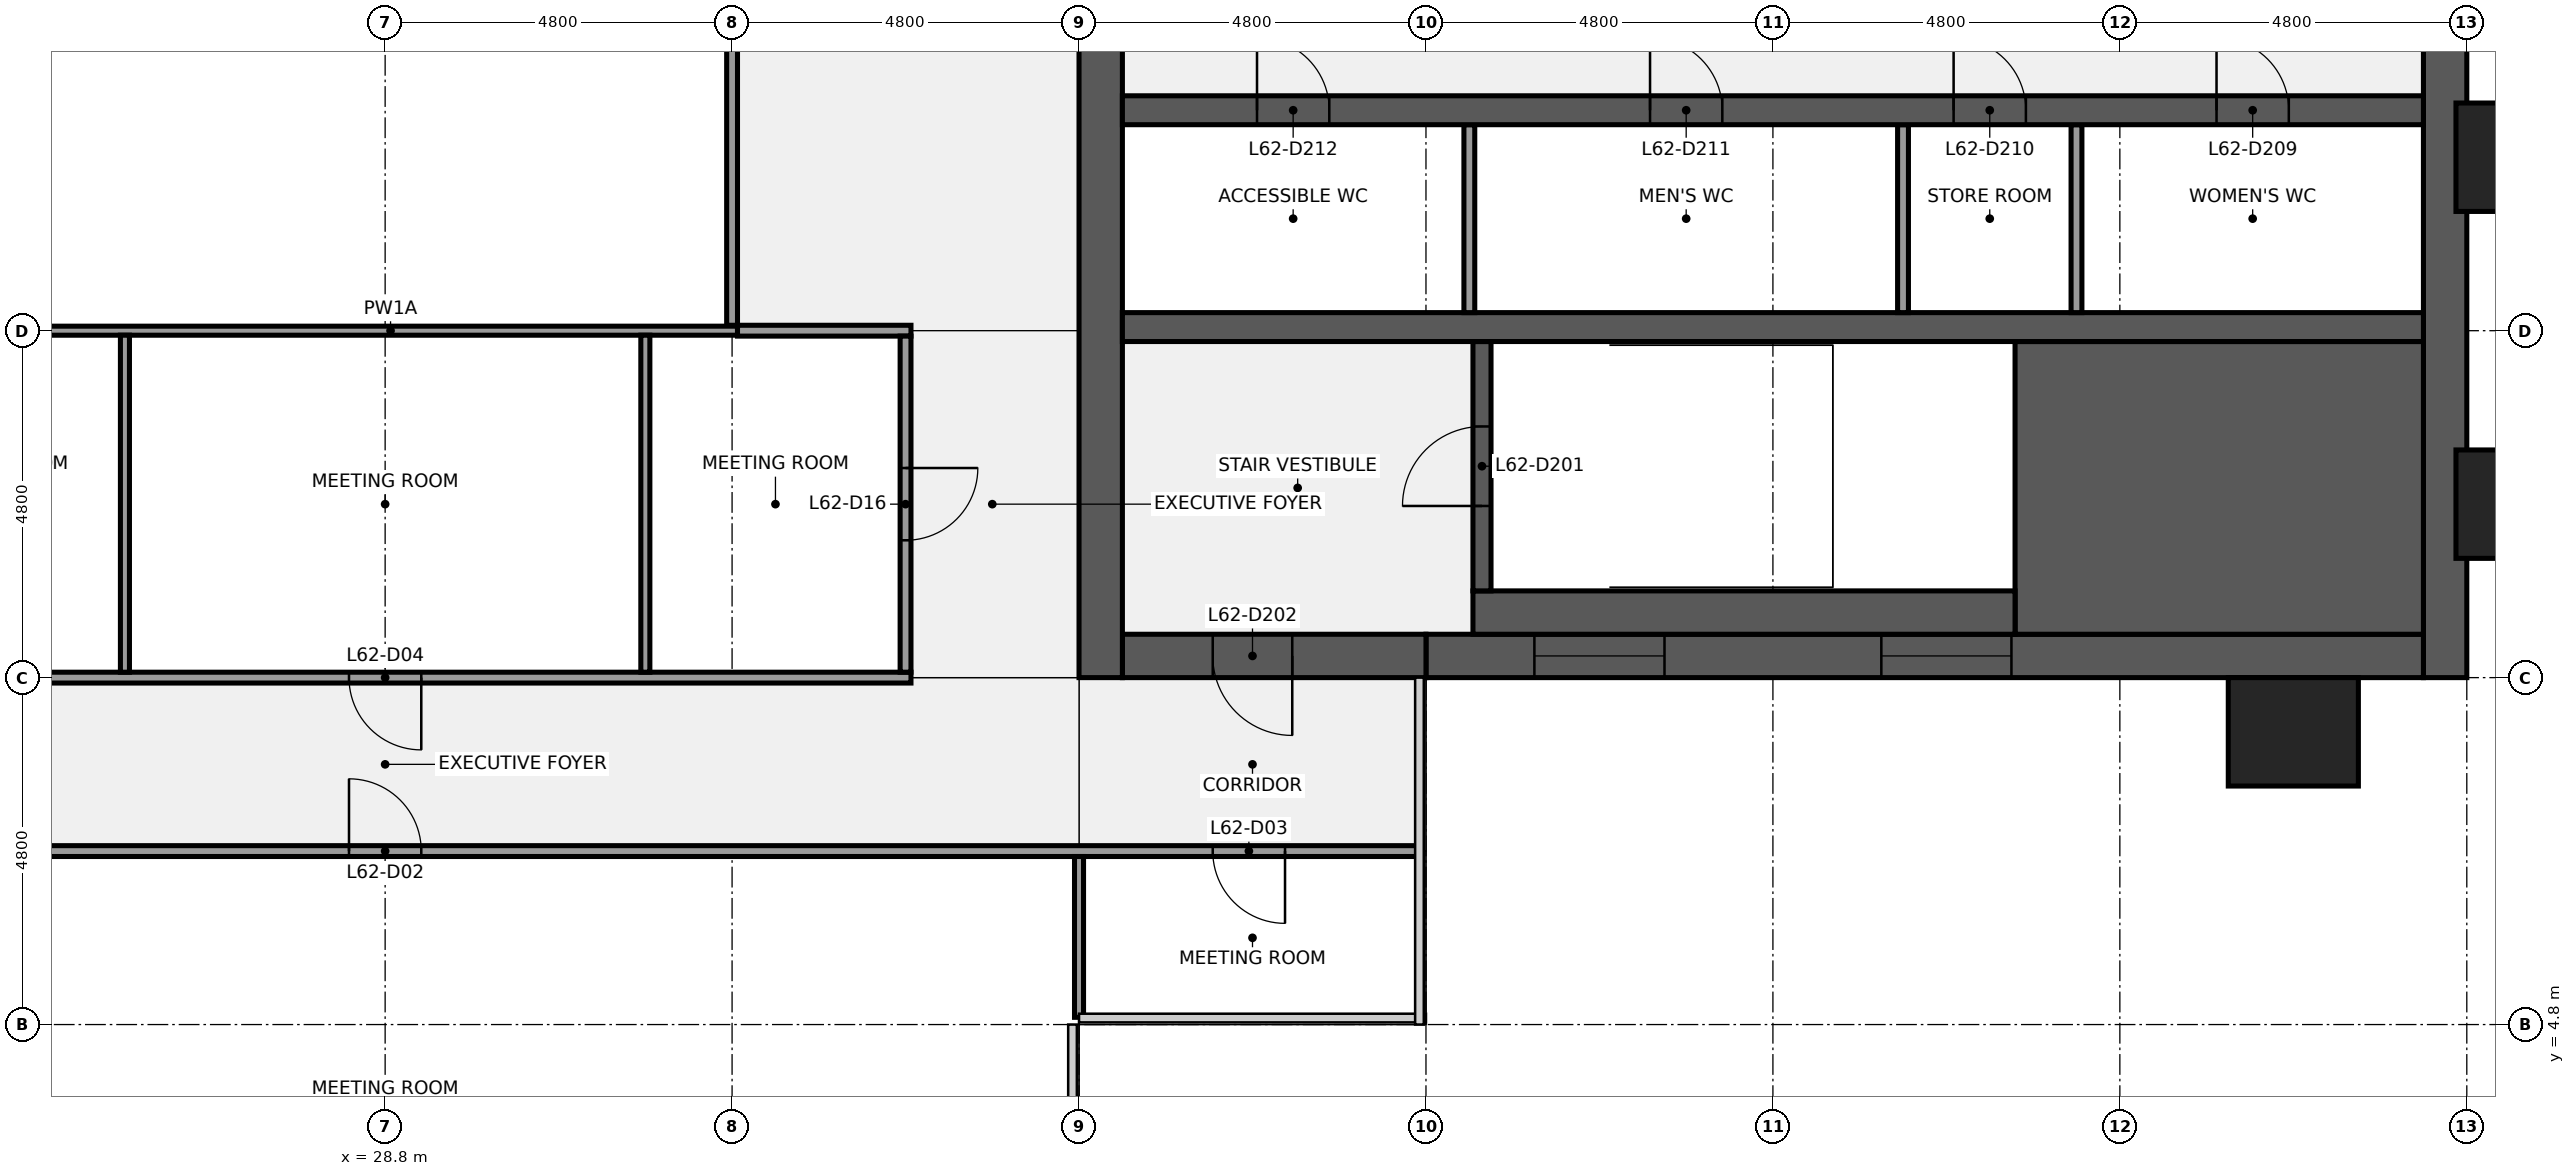
"""IFC4 building model, lengths in metres.
Left out: names, types, materials, properties, quantities, classifications, styles, units other than length and angle.
Written with IfcOpenShell. Run it as: python <this file> out.ifc"""

import sys

from ifc_helpers import new_model, si_unit, direction, frame, frame_2d, origin, origin_2d, place, context, subcontext, project, spatial, rectangle, extrude, element, fill, save


model = new_model("IFC4")
c1 = context("Model", 3, precision=1e-05, world=origin(), true_north=direction((0.0, 1.0)))
c2 = subcontext(c1, "Body", "Model", "MODEL_VIEW")
j1 = project(units=[si_unit("LENGTHUNIT", "METRE"), si_unit("PLANEANGLEUNIT", "RADIAN")], contexts=[c1])
p1 = place(None, origin())
s1 = spatial("IfcSite", under=j1, at=p1, CompositionType="ELEMENT")
p2 = place(p1, origin())
s2 = spatial("IfcBuilding", under=s1, at=p2, CompositionType="ELEMENT")
p3 = place(p2, frame((0.0, 0.0, 286.3)))
s3 = spatial("IfcBuildingStorey", under=s2, at=p3, CompositionType="ELEMENT", Elevation=286.3)
p4 = place(p3, frame((57.3, 38.4, 0.0), z_axis=(0.0, 0.0, 1.0), x_axis=(0.0, -1.0, 0.0)))
e1 = element("IfcWall", 1, at=p4, inside=s3, PredefinedType="SHEAR", context=c2, shape_type="SweptSolid", body=[
    extrude(rectangle(XDim=28.8, YDim=0.6, at=frame_2d((14.4, 0.0))), origin(), (0.0, 0.0, 1.0), 3.84),
])
p5 = place(p4, frame((18.45, 0.0, 0.9)))
e2 = element("IfcOpeningElement", 2, at=p5, cuts=e1, PredefinedType="OPENING", context=c2, shape_type="SweptSolid", body=[
    extrude(rectangle(XDim=1.5, YDim=1.5, at=frame_2d((0.75, 0.75))), frame((0.0, 0.31, 0.0), z_axis=(0.0, -1.0, 0.0), x_axis=(1.0, 0.0, 0.0)), (0.0, 0.0, 1.0), 0.62),
])
p6 = place(p4, frame((8.85, 0.0, 0.9)))
e3 = element("IfcOpeningElement", 3, at=p6, cuts=e1, PredefinedType="OPENING", context=c2, shape_type="SweptSolid", body=[
    extrude(rectangle(XDim=1.5, YDim=1.5, at=frame_2d((0.75, 0.75))), frame((0.0, 0.31, 0.0), z_axis=(0.0, -1.0, 0.0), x_axis=(1.0, 0.0, 0.0)), (0.0, 0.0, 1.0), 0.62),
])
p7 = place(p3, frame((57.0, 9.9, 0.0), z_axis=(0.0, 0.0, 1.0), x_axis=(-1.0, 0.0, 0.0)))
e4 = element("IfcWall", 4, at=p7, inside=s3, PredefinedType="SHEAR", context=c2, shape_type="SweptSolid", body=[
    extrude(rectangle(XDim=13.8, YDim=0.6, at=frame_2d((6.9, 0.0))), origin(), (0.0, 0.0, 1.0), 3.84),
])
p8 = place(p7, frame((5.7, 0.0, 0.9)))
e5 = element("IfcOpeningElement", 5, at=p8, cuts=e4, PredefinedType="OPENING", context=c2, shape_type="SweptSolid", body=[
    extrude(rectangle(XDim=1.8, YDim=1.5, at=frame_2d((0.9, 0.75))), frame((0.0, 0.31, 0.0), z_axis=(0.0, -1.0, 0.0), x_axis=(1.0, 0.0, 0.0)), (0.0, 0.0, 1.0), 0.62),
])
p9 = place(p7, frame((10.5, 0.0, 0.9)))
e6 = element("IfcOpeningElement", 6, at=p9, cuts=e4, PredefinedType="OPENING", context=c2, shape_type="SweptSolid", body=[
    extrude(rectangle(XDim=1.8, YDim=1.5, at=frame_2d((0.9, 0.75))), frame((0.0, 0.31, 0.0), z_axis=(0.0, -1.0, 0.0), x_axis=(1.0, 0.0, 0.0)), (0.0, 0.0, 1.0), 0.62),
])
p10 = place(p3, frame((43.2, 9.9, 0.0), z_axis=(0.0, 0.0, 1.0), x_axis=(-1.0, 0.0, 0.0)))
e7 = element("IfcWall", 7, at=p10, inside=s3, PredefinedType="SHEAR", context=c2, shape_type="SweptSolid", body=[
    extrude(rectangle(XDim=4.2, YDim=0.6, at=frame_2d((2.1, 0.0))), origin(), (0.0, 0.0, 1.0), 3.84),
])
p11 = place(p10, frame((1.85, 0.0, 0.0)))
e8 = element("IfcOpeningElement", 8, at=p11, cuts=e7, PredefinedType="OPENING", context=c2, shape_type="SweptSolid", body=[
    extrude(rectangle(XDim=1.1, YDim=2.1, at=frame_2d((0.55, 1.05))), frame((0.0, 0.31, 0.0), z_axis=(0.0, -1.0, 0.0), x_axis=(1.0, 0.0, 0.0)), (0.0, 0.0, 1.0), 0.62),
])
p12 = place(p3, frame((38.7, 9.6, 0.0), z_axis=(0.0, 0.0, 1.0), x_axis=(0.0, 1.0, 0.0)))
e9 = element("IfcWall", 9, at=p12, inside=s3, PredefinedType="SHEAR", context=c2, shape_type="SweptSolid", body=[
    extrude(rectangle(XDim=28.8, YDim=0.6, at=frame_2d((14.4, 0.0))), origin(), (0.0, 0.0, 1.0), 3.84),
])
p13 = place(p12, frame((8.7, 0.0, 0.0)))
e10 = element("IfcOpeningElement", 10, at=p13, cuts=e9, PredefinedType="OPENING", context=c2, shape_type="SweptSolid", body=[
    extrude(rectangle(XDim=1.8, YDim=2.1, at=frame_2d((0.9, 1.05))), frame((0.0, 0.31, 0.0), z_axis=(0.0, -1.0, 0.0), x_axis=(1.0, 0.0, 0.0)), (0.0, 0.0, 1.0), 0.62),
])
p14 = place(p12, frame((18.3, 0.0, 0.0)))
e11 = element("IfcOpeningElement", 11, at=p14, cuts=e9, PredefinedType="OPENING", context=c2, shape_type="SweptSolid", body=[
    extrude(rectangle(XDim=1.8, YDim=2.1, at=frame_2d((0.9, 1.05))), frame((0.0, 0.31, 0.0), z_axis=(0.0, -1.0, 0.0), x_axis=(1.0, 0.0, 0.0)), (0.0, 0.0, 1.0), 0.62),
])
p15 = place(p3, frame((51.35, 12.225, 0.0), z_axis=(0.0, 0.0, 1.0), x_axis=(1.0, 0.0, 0.0)))
e12 = element("IfcWall", 12, at=p15, inside=s3, PredefinedType="SHEAR", context=c2, shape_type="SweptSolid", body=[
    extrude(rectangle(XDim=5.65, YDim=4.05, at=frame_2d((2.825, 0.0))), origin(), (0.0, 0.0, 1.0), 3.84),
])
p16 = place(p3, frame((43.85, 10.5, 0.0), z_axis=(0.0, 0.0, 1.0), x_axis=(1.0, 0.0, 0.0)))
e13 = element("IfcWall", 13, at=p16, inside=s3, PredefinedType="SHEAR", context=c2, shape_type="SweptSolid", body=[
    extrude(rectangle(XDim=7.5, YDim=0.6, at=frame_2d((3.75, 0.0))), origin(), (0.0, 0.0, 1.0), 3.84),
])
p17 = place(p3, frame((43.975, 10.8, 0.0), z_axis=(0.0, 0.0, 1.0), x_axis=(0.0, 1.0, 0.0)))
e14 = element("IfcWall", 14, at=p17, inside=s3, PredefinedType="SHEAR", context=c2, shape_type="SweptSolid", body=[
    extrude(rectangle(XDim=3.45, YDim=0.25, at=frame_2d((1.725, 0.0))), origin(), (0.0, 0.0, 1.0), 3.84),
])
p18 = place(p17, frame((1.175, 0.0, 0.0)))
e15 = element("IfcOpeningElement", 15, at=p18, cuts=e14, PredefinedType="OPENING", context=c2, shape_type="SweptSolid", body=[
    extrude(rectangle(XDim=1.1, YDim=2.1, at=frame_2d((0.55, 1.05))), frame((0.0, 0.135, 0.0), z_axis=(0.0, -1.0, 0.0), x_axis=(1.0, 0.0, 0.0)), (0.0, 0.0, 1.0), 0.27),
])
p19 = place(p3, frame((39.0, 14.45, 0.0), z_axis=(0.0, 0.0, 1.0), x_axis=(1.0, 0.0, 0.0)))
e16 = element("IfcWall", 16, at=p19, inside=s3, PredefinedType="SHEAR", context=c2, shape_type="SweptSolid", body=[
    extrude(rectangle(XDim=18.0, YDim=0.4, at=frame_2d((9.0, 0.0))), origin(), (0.0, 0.0, 1.0), 3.84),
])
for number, where, z_axis, x_axis in (
    (17, (52.2, 14.65, 0.0), (0.0, 0.0, 1.0), (0.0, 1.0, 0.0)),
    (18, (49.8, 14.65, 0.0), (0.0, 0.0, 1.0), (0.0, 1.0, 0.0)),
    (19, (43.8, 14.65, 0.0), (0.0, 0.0, 1.0), (0.0, 1.0, 0.0)),
):
    element("IfcWall", number, at=place(p3, frame(where, z_axis=z_axis, x_axis=x_axis)), inside=s3, PredefinedType="PARTITIONING", context=c2, shape_type="SweptSolid", body=[
        extrude(rectangle(XDim=2.6, YDim=0.15, at=frame_2d((1.3, 0.0))), origin(), (0.0, 0.0, 1.0), 3.84),
    ])
p20 = place(p3, frame((39.0, 17.45, 0.0), z_axis=(0.0, 0.0, 1.0), x_axis=(1.0, 0.0, 0.0)))
e20 = element("IfcWall", 20, at=p20, inside=s3, PredefinedType="SHEAR", context=c2, shape_type="SweptSolid", body=[
    extrude(rectangle(XDim=18.0, YDim=0.4, at=frame_2d((9.0, 0.0))), origin(), (0.0, 0.0, 1.0), 3.84),
])
p21 = place(p20, frame((15.137, 0.0, 0.0)))
e21 = element("IfcOpeningElement", 21, at=p21, cuts=e20, PredefinedType="OPENING", context=c2, shape_type="SweptSolid", body=[
    extrude(rectangle(XDim=1.0, YDim=2.1, at=frame_2d((0.5, 1.05))), frame((0.0, 0.21, 0.0), z_axis=(0.0, -1.0, 0.0), x_axis=(1.0, 0.0, 0.0)), (0.0, 0.0, 1.0), 0.42),
])
p22 = place(p20, frame((11.5, 0.0, 0.0)))
e22 = element("IfcOpeningElement", 22, at=p22, cuts=e20, PredefinedType="OPENING", context=c2, shape_type="SweptSolid", body=[
    extrude(rectangle(XDim=1.0, YDim=2.1, at=frame_2d((0.5, 1.05))), frame((0.0, 0.21, 0.0), z_axis=(0.0, -1.0, 0.0), x_axis=(1.0, 0.0, 0.0)), (0.0, 0.0, 1.0), 0.42),
])
p23 = place(p20, frame((7.3, 0.0, 0.0)))
e23 = element("IfcOpeningElement", 23, at=p23, cuts=e20, PredefinedType="OPENING", context=c2, shape_type="SweptSolid", body=[
    extrude(rectangle(XDim=1.0, YDim=2.1, at=frame_2d((0.5, 1.05))), frame((0.0, 0.21, 0.0), z_axis=(0.0, -1.0, 0.0), x_axis=(1.0, 0.0, 0.0)), (0.0, 0.0, 1.0), 0.42),
])
p24 = place(p20, frame((1.863, 0.0, 0.0)))
e24 = element("IfcOpeningElement", 24, at=p24, cuts=e20, PredefinedType="OPENING", context=c2, shape_type="SweptSolid", body=[
    extrude(rectangle(XDim=1.0, YDim=2.1, at=frame_2d((0.5, 1.05))), frame((0.0, 0.21, 0.0), z_axis=(0.0, -1.0, 0.0), x_axis=(1.0, 0.0, 0.0)), (0.0, 0.0, 1.0), 0.42),
])
p25 = place(p3, frame((14.5, 7.2, 0.0), z_axis=(0.0, 0.0, 1.0), x_axis=(1.0, 0.0, 0.0)))
e25 = element("IfcWall", 25, at=p25, inside=s3, PredefinedType="PARTITIONING", context=c2, shape_type="SweptSolid", body=[
    extrude(rectangle(XDim=28.6, YDim=0.15, at=frame_2d((14.3, 0.0))), origin(), (0.0, 0.0, 1.0), 2.849),
])
p26 = place(p25, frame((1.85, 0.0, 0.0)))
e26 = element("IfcOpeningElement", 26, at=p26, cuts=e25, PredefinedType="OPENING", context=c2, shape_type="SweptSolid", body=[
    extrude(rectangle(XDim=1.0, YDim=2.1, at=frame_2d((0.5, 1.05))), frame((0.0, 0.085, 0.0), z_axis=(0.0, -1.0, 0.0), x_axis=(1.0, 0.0, 0.0)), (0.0, 0.0, 1.0), 0.17),
])
p27 = place(p25, frame((13.8, 0.0, 0.0)))
e27 = element("IfcOpeningElement", 27, at=p27, cuts=e25, PredefinedType="OPENING", context=c2, shape_type="SweptSolid", body=[
    extrude(rectangle(XDim=1.0, YDim=2.1, at=frame_2d((0.5, 1.05))), frame((0.0, 0.085, 0.0), z_axis=(0.0, -1.0, 0.0), x_axis=(1.0, 0.0, 0.0)), (0.0, 0.0, 1.0), 0.17),
])
p28 = place(p25, frame((25.75, 0.0, 0.0)))
e28 = element("IfcOpeningElement", 28, at=p28, cuts=e25, PredefinedType="OPENING", context=c2, shape_type="SweptSolid", body=[
    extrude(rectangle(XDim=1.0, YDim=2.1, at=frame_2d((0.5, 1.05))), frame((0.0, 0.085, 0.0), z_axis=(0.0, -1.0, 0.0), x_axis=(1.0, 0.0, 0.0)), (0.0, 0.0, 1.0), 0.17),
])
p29 = place(p3, frame((21.525, 9.6, 0.0), z_axis=(0.0, 0.0, 1.0), x_axis=(1.0, 0.0, 0.0)))
e29 = element("IfcWall", 29, at=p29, inside=s3, PredefinedType="PARTITIONING", context=c2, shape_type="SweptSolid", body=[
    extrude(rectangle(XDim=14.55, YDim=0.15, at=frame_2d((7.275, 0.0))), origin(), (0.0, 0.0, 1.0), 2.849),
])
p30 = place(p29, frame((6.775, 0.0, 0.0)))
e30 = element("IfcOpeningElement", 30, at=p30, cuts=e29, PredefinedType="OPENING", context=c2, shape_type="SweptSolid", body=[
    extrude(rectangle(XDim=1.0, YDim=2.1, at=frame_2d((0.5, 1.05))), frame((0.0, 0.085, 0.0), z_axis=(0.0, -1.0, 0.0), x_axis=(1.0, 0.0, 0.0)), (0.0, 0.0, 1.0), 0.17),
])
p31 = place(p3, frame((24.075, 14.4, 0.0), z_axis=(0.0, 0.0, 1.0), x_axis=(1.0, 0.0, 0.0)))
e31 = element("IfcWall", 31, at=p31, inside=s3, PredefinedType="PARTITIONING", context=c2, shape_type="SweptSolid", body=[
    extrude(rectangle(XDim=9.6, YDim=0.125, at=frame_2d((4.8, 0.0))), origin(), (0.0, 0.0, 1.0), 2.849),
])
p32 = place(p3, frame((33.675, 14.4, 0.0), z_axis=(0.0, 0.0, 1.0), x_axis=(1.0, 0.0, 0.0)))
e32 = element("IfcWall", 32, at=p32, inside=s3, PredefinedType="PARTITIONING", context=c2, shape_type="SweptSolid", body=[
    extrude(rectangle(XDim=2.4, YDim=0.15, at=frame_2d((1.2, 0.0))), origin(), (0.0, 0.0, 1.0), 2.849),
])
for number, where, z_axis, x_axis in (
    (33, (25.2, 9.675, 0.0), (0.0, 0.0, 1.0), (0.0, 1.0, 0.0)),
    (34, (32.4, 9.675, 0.0), (0.0, 0.0, 1.0), (0.0, 1.0, 0.0)),
):
    element("IfcWall", number, at=place(p3, frame(where, z_axis=z_axis, x_axis=x_axis)), inside=s3, PredefinedType="PARTITIONING", context=c2, shape_type="SweptSolid", body=[
        extrude(rectangle(XDim=4.662, YDim=0.125, at=frame_2d((2.331, 0.0))), origin(), (0.0, 0.0, 1.0), 2.849),
    ])
p33 = place(p3, frame((33.6, 14.475, 0.0), z_axis=(0.0, 0.0, 1.0), x_axis=(0.0, 1.0, 0.0)))
e35 = element("IfcWall", 35, at=p33, inside=s3, PredefinedType="PARTITIONING", context=c2, shape_type="SweptSolid", body=[
    extrude(rectangle(XDim=10.65, YDim=0.15, at=frame_2d((5.325, 0.0))), origin(), (0.0, 0.0, 1.0), 2.849),
])
p34 = place(p3, frame((36.0, 9.675, 0.0), z_axis=(0.0, 0.0, 1.0), x_axis=(0.0, 1.0, 0.0)))
e36 = element("IfcWall", 36, at=p34, inside=s3, PredefinedType="PARTITIONING", context=c2, shape_type="SweptSolid", body=[
    extrude(rectangle(XDim=4.65, YDim=0.15, at=frame_2d((2.325, 0.0))), origin(), (0.0, 0.0, 1.0), 2.849),
])
p35 = place(p34, frame((1.825, 0.0, 0.0)))
e37 = element("IfcOpeningElement", 37, at=p35, cuts=e36, PredefinedType="OPENING", context=c2, shape_type="SweptSolid", body=[
    extrude(rectangle(XDim=1.0, YDim=2.1, at=frame_2d((0.5, 1.05))), frame((0.0, 0.085, 0.0), z_axis=(0.0, -1.0, 0.0), x_axis=(1.0, 0.0, 0.0)), (0.0, 0.0, 1.0), 0.17),
])
p36 = place(p3, frame((38.4, 4.9, 0.0), z_axis=(0.0, 0.0, 1.0), x_axis=(0.0, 1.0, 0.0)))
e38 = element("IfcWall", 38, at=p36, inside=s3, PredefinedType="PARTITIONING", context=c2, shape_type="SweptSolid", body=[
    extrude(rectangle(XDim=2.225, YDim=0.125, at=frame_2d((1.113, 0.0))), origin(), (0.0, 0.0, 1.0), 2.849),
])
for number, where, z_axis, x_axis in (
    (39, (55.2, 8.85, 0.0), (0.0, 0.0, 1.0), (1.0, 0.0, 0.0)),
    (40, (58.35, 12.0, 0.0), (0.0, 0.0, 1.0), (0.0, 1.0, 0.0)),
    (41, (58.35, 16.8, 0.0), (0.0, 0.0, 1.0), (0.0, 1.0, 0.0)),
):
    element("IfcColumn", number, at=place(p3, frame(where, z_axis=z_axis, x_axis=x_axis)), inside=s3, PredefinedType="PILASTER", context=c2, shape_type="SweptSolid", body=[
        extrude(rectangle(XDim=1.8, YDim=1.5, at=origin_2d()), origin(), (0.0, 0.0, 1.0), 4.0),
    ])
p37 = place(p18, origin())
e42 = element("IfcDoor", 42, at=p37, inside=s3, OperationType="SINGLE_SWING_LEFT", PredefinedType="DOOR", context=c2, shape_type="SweptSolid", body=[
    extrude(rectangle(XDim=1.1, YDim=2.1, at=frame_2d((0.55, 1.05))), frame((0.0, 0.025, 0.0), z_axis=(0.0, -1.0, 0.0), x_axis=(1.0, 0.0, 0.0)), (0.0, 0.0, 1.0), 0.05),
])
fill(e15, e42)
p38 = place(p11, origin())
e43 = element("IfcDoor", 43, at=p38, inside=s3, OperationType="SINGLE_SWING_LEFT", PredefinedType="DOOR", context=c2, shape_type="SweptSolid", body=[
    extrude(rectangle(XDim=1.1, YDim=2.1, at=frame_2d((0.55, 1.05))), frame((0.0, 0.025, 0.0), z_axis=(0.0, -1.0, 0.0), x_axis=(1.0, 0.0, 0.0)), (0.0, 0.0, 1.0), 0.05),
])
fill(e8, e43)
p39 = place(p21, origin())
e44 = element("IfcDoor", 44, at=p39, inside=s3, OperationType="SINGLE_SWING_LEFT", PredefinedType="DOOR", context=c2, shape_type="SweptSolid", body=[
    extrude(rectangle(XDim=1.0, YDim=2.1, at=frame_2d((0.5, 1.05))), frame((0.0, 0.025, 0.0), z_axis=(0.0, -1.0, 0.0), x_axis=(1.0, 0.0, 0.0)), (0.0, 0.0, 1.0), 0.05),
])
fill(e21, e44)
p40 = place(p22, origin())
e45 = element("IfcDoor", 45, at=p40, inside=s3, OperationType="SINGLE_SWING_LEFT", PredefinedType="DOOR", context=c2, shape_type="SweptSolid", body=[
    extrude(rectangle(XDim=1.0, YDim=2.1, at=frame_2d((0.5, 1.05))), frame((0.0, 0.025, 0.0), z_axis=(0.0, -1.0, 0.0), x_axis=(1.0, 0.0, 0.0)), (0.0, 0.0, 1.0), 0.05),
])
fill(e22, e45)
p41 = place(p23, origin())
e46 = element("IfcDoor", 46, at=p41, inside=s3, OperationType="SINGLE_SWING_LEFT", PredefinedType="DOOR", context=c2, shape_type="SweptSolid", body=[
    extrude(rectangle(XDim=1.0, YDim=2.1, at=frame_2d((0.5, 1.05))), frame((0.0, 0.025, 0.0), z_axis=(0.0, -1.0, 0.0), x_axis=(1.0, 0.0, 0.0)), (0.0, 0.0, 1.0), 0.05),
])
fill(e23, e46)
p42 = place(p24, origin())
e47 = element("IfcDoor", 47, at=p42, inside=s3, OperationType="SINGLE_SWING_LEFT", PredefinedType="DOOR", context=c2, shape_type="SweptSolid", body=[
    extrude(rectangle(XDim=1.0, YDim=2.1, at=frame_2d((0.5, 1.05))), frame((0.0, 0.025, 0.0), z_axis=(0.0, -1.0, 0.0), x_axis=(1.0, 0.0, 0.0)), (0.0, 0.0, 1.0), 0.05),
])
fill(e24, e47)
p43 = place(p8, origin())
e48 = element("IfcWindow", 48, at=p43, inside=s3, PartitioningType="SINGLE_PANEL", PredefinedType="WINDOW", context=c2, shape_type="SweptSolid", body=[
    extrude(rectangle(XDim=1.8, YDim=1.5, at=frame_2d((0.9, 0.75))), frame((0.0, 0.03, 0.0), z_axis=(0.0, -1.0, 0.0), x_axis=(1.0, 0.0, 0.0)), (0.0, 0.0, 1.0), 0.06),
])
fill(e5, e48)
p44 = place(p9, origin())
e49 = element("IfcWindow", 49, at=p44, inside=s3, PartitioningType="SINGLE_PANEL", PredefinedType="WINDOW", context=c2, shape_type="SweptSolid", body=[
    extrude(rectangle(XDim=1.8, YDim=1.5, at=frame_2d((0.9, 0.75))), frame((0.0, 0.03, 0.0), z_axis=(0.0, -1.0, 0.0), x_axis=(1.0, 0.0, 0.0)), (0.0, 0.0, 1.0), 0.06),
])
fill(e6, e49)
p45 = place(p27, origin())
e50 = element("IfcDoor", 50, at=p45, inside=s3, OperationType="SINGLE_SWING_LEFT", PredefinedType="DOOR", context=c2, shape_type="SweptSolid", body=[
    extrude(rectangle(XDim=1.0, YDim=2.1, at=frame_2d((0.5, 1.05))), frame((0.0, 0.025, 0.0), z_axis=(0.0, -1.0, 0.0), x_axis=(1.0, 0.0, 0.0)), (0.0, 0.0, 1.0), 0.05),
])
fill(e27, e50)
p46 = place(p28, origin())
e51 = element("IfcDoor", 51, at=p46, inside=s3, OperationType="SINGLE_SWING_RIGHT", PredefinedType="DOOR", context=c2, shape_type="SweptSolid", body=[
    extrude(rectangle(XDim=1.0, YDim=2.1, at=frame_2d((0.5, 1.05))), frame((0.0, 0.025, 0.0), z_axis=(0.0, -1.0, 0.0), x_axis=(1.0, 0.0, 0.0)), (0.0, 0.0, 1.0), 0.05),
])
fill(e28, e51)
p47 = place(p30, origin())
e52 = element("IfcDoor", 52, at=p47, inside=s3, OperationType="SINGLE_SWING_RIGHT", PredefinedType="DOOR", context=c2, shape_type="SweptSolid", body=[
    extrude(rectangle(XDim=1.0, YDim=2.1, at=frame_2d((0.5, 1.05))), frame((0.0, 0.025, 0.0), z_axis=(0.0, -1.0, 0.0), x_axis=(1.0, 0.0, 0.0)), (0.0, 0.0, 1.0), 0.05),
])
fill(e30, e52)
p48 = place(p35, origin())
e53 = element("IfcDoor", 53, at=p48, inside=s3, OperationType="SINGLE_SWING_RIGHT", PredefinedType="DOOR", context=c2, shape_type="SweptSolid", body=[
    extrude(rectangle(XDim=1.0, YDim=2.1, at=frame_2d((0.5, 1.05))), frame((0.0, 0.025, 0.0), z_axis=(0.0, -1.0, 0.0), x_axis=(1.0, 0.0, 0.0)), (0.0, 0.0, 1.0), 0.05),
])
fill(e37, e53)
save(model, sys.argv[1])
